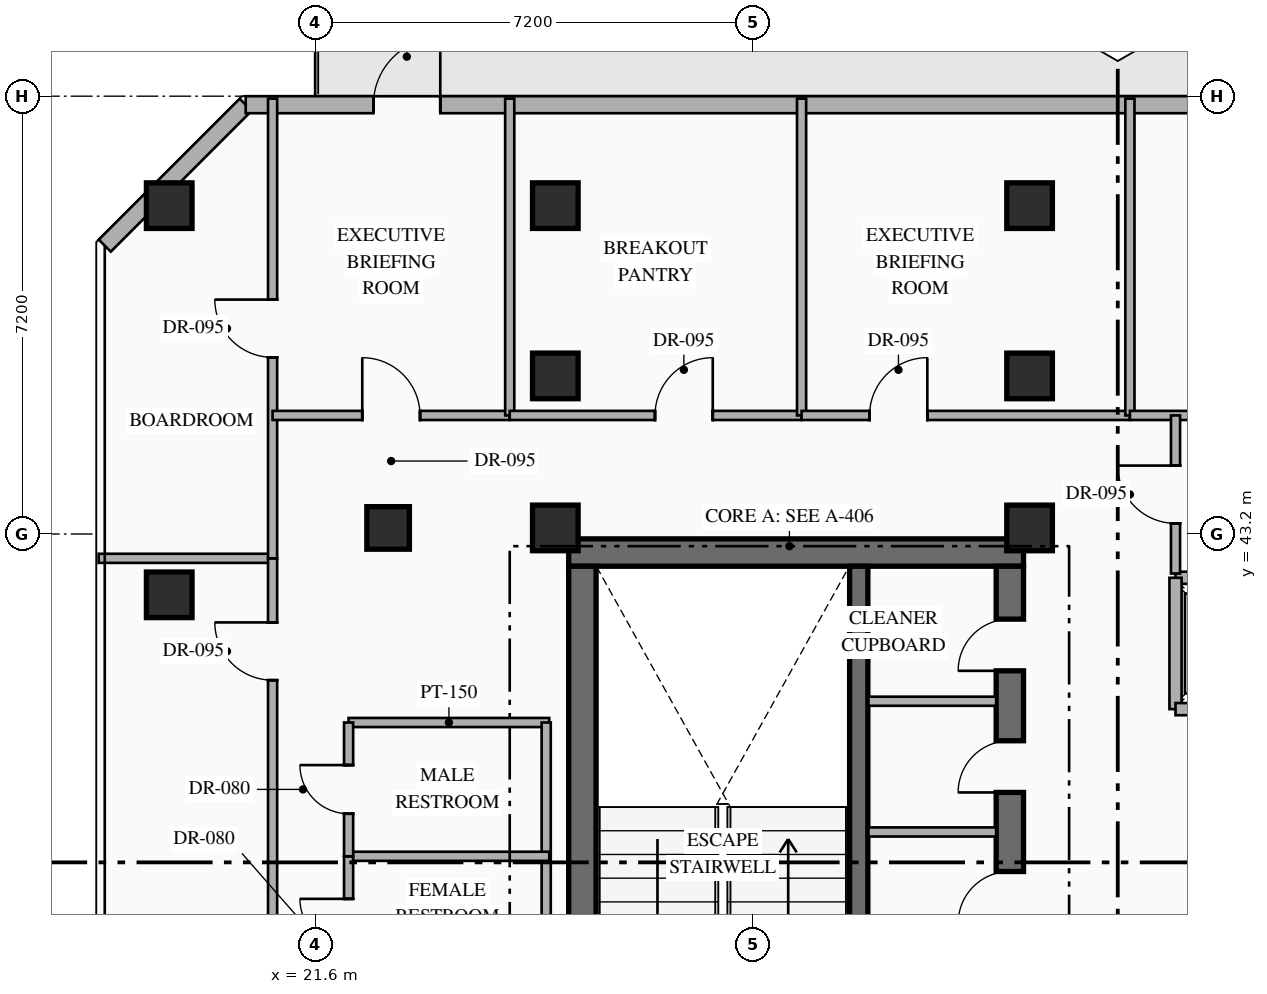
"""IFC4 building model, lengths in metres.
Left out: names, types, materials, properties, quantities, classifications, styles, units other than length and angle.
Written with IfcOpenShell. Run it as: python <this file> out.ifc"""

import sys

from ifc_helpers import new_model, si_unit, direction, frame, frame_2d, origin, origin_2d, place, context, subcontext, project, spatial, rectangle, hollow_rectangle, extrude, element, fill, save


model = new_model("IFC4")
c1 = context("Model", 3, precision=1e-05, world=origin(), true_north=direction((0.0, 1.0)))
c2 = subcontext(c1, "Body", "Model", "MODEL_VIEW")
j1 = project(units=[si_unit("LENGTHUNIT", "METRE"), si_unit("PLANEANGLEUNIT", "RADIAN")], contexts=[c1])
p1 = place(None, origin())
s1 = spatial("IfcSite", under=j1, at=p1, CompositionType="ELEMENT")
p2 = place(p1, origin())
s2 = spatial("IfcBuilding", under=s1, at=p2, CompositionType="ELEMENT")
p3 = place(p2, frame((0.0, 0.0, 195.15)))
s3 = spatial("IfcBuildingStorey", under=s2, at=p3, CompositionType="ELEMENT", Elevation=195.15)
p4 = place(p3, frame((25.77, 42.895, 0.0), z_axis=(0.0, 0.0, 1.0), x_axis=(1.0, 0.0, 0.0)))
e1 = element("IfcWall", 1, at=p4, inside=s3, PredefinedType="SHEAR", context=c2, shape_type="SweptSolid", body=[
    extrude(rectangle(XDim=7.48, YDim=0.45, at=frame_2d((3.74, 0.0))), origin(), (0.0, 0.0, 1.0), 3.6),
])
p5 = place(p3, frame((25.995, 33.19, 0.0), z_axis=(0.0, 0.0, 1.0), x_axis=(0.0, 1.0, 0.0)))
e2 = element("IfcWall", 2, at=p5, inside=s3, PredefinedType="SHEAR", context=c2, shape_type="SweptSolid", body=[
    extrude(rectangle(XDim=9.48, YDim=0.45, at=frame_2d((4.74, 0.0))), origin(), (0.0, 0.0, 1.0), 3.6),
])
p6 = place(p3, frame((33.025, 33.19, 0.0), z_axis=(0.0, 0.0, 1.0), x_axis=(0.0, 1.0, 0.0)))
e3 = element("IfcWall", 3, at=p6, inside=s3, PredefinedType="SHEAR", context=c2, shape_type="SweptSolid", body=[
    extrude(rectangle(XDim=9.48, YDim=0.45, at=frame_2d((4.74, 0.0))), origin(), (0.0, 0.0, 1.0), 3.6),
])
p7 = place(p6, frame((3.61, 0.0, 0.0)))
e4 = element("IfcOpeningElement", 4, at=p7, cuts=e3, PredefinedType="OPENING", context=c2, shape_type="SweptSolid", body=[
    extrude(rectangle(XDim=0.85, YDim=2.08, at=frame_2d((0.425, 1.04))), frame((0.0, 0.235, 0.0), z_axis=(0.0, -1.0, 0.0), x_axis=(1.0, 0.0, 0.0)), (0.0, 0.0, 1.0), 0.47),
])
p8 = place(p6, frame((5.76, 0.0, 0.0)))
e5 = element("IfcOpeningElement", 5, at=p8, cuts=e3, PredefinedType="OPENING", context=c2, shape_type="SweptSolid", body=[
    extrude(rectangle(XDim=0.85, YDim=2.08, at=frame_2d((0.425, 1.04))), frame((0.0, 0.235, 0.0), z_axis=(0.0, -1.0, 0.0), x_axis=(1.0, 0.0, 0.0)), (0.0, 0.0, 1.0), 0.47),
])
p9 = place(p6, frame((7.76, 0.0, 0.0)))
e6 = element("IfcOpeningElement", 6, at=p9, cuts=e3, PredefinedType="OPENING", context=c2, shape_type="SweptSolid", body=[
    extrude(rectangle(XDim=0.85, YDim=2.08, at=frame_2d((0.425, 1.04))), frame((0.0, 0.235, 0.0), z_axis=(0.0, -1.0, 0.0), x_axis=(1.0, 0.0, 0.0)), (0.0, 0.0, 1.0), 0.47),
])
p10 = place(p3, frame((30.54, 33.19, 0.0), z_axis=(0.0, 0.0, 1.0), x_axis=(0.0, 1.0, 0.0)))
e7 = element("IfcWall", 7, at=p10, inside=s3, PredefinedType="SHEAR", context=c2, shape_type="SweptSolid", body=[
    extrude(rectangle(XDim=9.48, YDim=0.3, at=frame_2d((4.74, 0.0))), origin(), (0.0, 0.0, 1.0), 3.6),
])
for number, where, z_axis, x_axis in (
    (8, (25.55, 43.3, 0.0), (0.0, 0.0, 1.0), (1.0, 0.0, 0.0)),
    (9, (33.35, 43.3, 0.0), (0.0, 0.0, 1.0), (1.0, 0.0, 0.0)),
    (10, (25.55, 45.8, 0.0), (0.0, 0.0, 1.0), (1.0, 0.0, 0.0)),
    (11, (33.35, 45.8, 0.0), (0.0, 0.0, 1.0), (1.0, 0.0, 0.0)),
    (12, (19.2, 48.6, 0.0), (0.0, 0.0, 1.0), (1.0, 0.0, 0.0)),
    (13, (25.55, 48.6, 0.0), (0.0, 0.0, 1.0), (1.0, 0.0, 0.0)),
    (14, (33.35, 48.6, 0.0), (0.0, 0.0, 1.0), (1.0, 0.0, 0.0)),
    (15, (19.2, 42.2, 0.0), (0.0, 0.0, 1.0), (1.0, 0.0, 0.0)),
):
    element("IfcColumn", number, at=place(p3, frame(where, z_axis=z_axis, x_axis=x_axis)), inside=s3, PredefinedType="COLUMN", context=c2, shape_type="SweptSolid", body=[
        extrude(hollow_rectangle(XDim=0.75, YDim=0.75, WallThickness=0.028, at=origin_2d()), origin(), (0.0, 0.0, 1.0), 3.6),
    ])
p11 = place(p3, frame((22.8, 43.3, 0.0), z_axis=(0.0, 0.0, 1.0), x_axis=(1.0, 0.0, 0.0)))
e16 = element("IfcColumn", 16, at=p11, inside=s3, PredefinedType="COLUMN", context=c2, shape_type="SweptSolid", body=[
    extrude(hollow_rectangle(XDim=0.7, YDim=0.7, WallThickness=0.028, at=origin_2d()), origin(), (0.0, 0.0, 1.0), 3.6),
])
p12 = place(p3, frame((18.14, 47.942, 0.0), z_axis=(0.0, 0.0, 1.0), x_axis=(0.707106781187, 0.707106781187, 0.0)))
e17 = element("IfcWall", 17, at=p12, inside=s3, PredefinedType="STANDARD", context=c2, shape_type="SweptSolid", body=[
    extrude(rectangle(XDim=3.278, YDim=0.28, at=frame_2d((1.639, 0.0))), origin(), (0.0, 0.0, 1.0), 3.35),
])
p13 = place(p3, frame((20.458, 50.26, 0.0), z_axis=(0.0, 0.0, 1.0), x_axis=(1.0, 0.0, 0.0)))
e18 = element("IfcWall", 18, at=p13, inside=s3, PredefinedType="STANDARD", context=c2, shape_type="SweptSolid", body=[
    extrude(rectangle(XDim=22.084, YDim=0.28, at=frame_2d((11.042, 0.0))), origin(), (0.0, 0.0, 1.0), 3.35),
])
p14 = place(p13, frame((2.1, 0.0, 0.0)))
e19 = element("IfcOpeningElement", 19, at=p14, cuts=e18, PredefinedType="OPENING", context=c2, shape_type="SweptSolid", body=[
    extrude(rectangle(XDim=1.1, YDim=2.2, at=frame_2d((0.55, 1.1))), frame((0.0, 0.15, 0.0), z_axis=(0.0, -1.0, 0.0), x_axis=(1.0, 0.0, 0.0)), (0.0, 0.0, 1.0), 0.3),
])
p15 = place(p13, frame((16.326, 0.0, 0.85)))
e20 = element("IfcOpeningElement", 20, at=p15, cuts=e18, PredefinedType="OPENING", context=c2, shape_type="SweptSolid", body=[
    extrude(rectangle(XDim=1.8, YDim=2.1, at=frame_2d((0.9, 1.05))), frame((0.0, 0.15, 0.0), z_axis=(0.0, -1.0, 0.0), x_axis=(1.0, 0.0, 0.0)), (0.0, 0.0, 1.0), 0.3),
])
for number, where, z_axis, x_axis in (
    (21, (30.7, 38.3, 0.0), (0.0, 0.0, 1.0), (1.0, 0.0, 0.0)),
    (22, (30.7, 40.45, 0.0), (0.0, 0.0, 1.0), (1.0, 0.0, 0.0)),
):
    element("IfcWall", number, at=place(p3, frame(where, z_axis=z_axis, x_axis=x_axis)), inside=s3, PredefinedType="PARTITIONING", context=c2, shape_type="SweptSolid", body=[
        extrude(rectangle(XDim=2.1, YDim=0.15, at=frame_2d((1.05, 0.0))), origin(), (0.0, 0.0, 1.0), 3.35),
    ])
p16 = place(p3, frame((35.75, 42.48, 0.0), z_axis=(0.0, 0.0, 1.0), x_axis=(1.0, 0.0, 0.0)))
e23 = element("IfcWall", 23, at=p16, inside=s3, PredefinedType="STANDARD", context=c2, shape_type="SweptSolid", body=[
    extrude(rectangle(XDim=9.11, YDim=0.2, at=frame_2d((4.555, 0.0))), origin(), (0.0, 0.0, 1.0), 3.35),
])
p17 = place(p3, frame((35.75, 40.32, 0.0), z_axis=(0.0, 0.0, 1.0), x_axis=(0.0, 1.0, 0.0)))
e24 = element("IfcWall", 24, at=p17, inside=s3, PredefinedType="STANDARD", context=c2, shape_type="SweptSolid", body=[
    extrude(rectangle(XDim=2.16, YDim=0.2, at=frame_2d((1.08, 0.0))), origin(), (0.0, 0.0, 1.0), 3.35),
])
p18 = place(p3, frame((35.75, 40.32, 0.0), z_axis=(0.0, 0.0, 1.0), x_axis=(1.0, 0.0, 0.0)))
e25 = element("IfcWall", 25, at=p18, inside=s3, PredefinedType="STANDARD", context=c2, shape_type="SweptSolid", body=[
    extrude(rectangle(XDim=9.11, YDim=0.2, at=frame_2d((4.555, 0.0))), origin(), (0.0, 0.0, 1.0), 3.35),
])
p19 = place(p18, frame((0.53, 0.0, 0.0)))
e26 = element("IfcOpeningElement", 26, at=p19, cuts=e25, PredefinedType="OPENING", context=c2, shape_type="SweptSolid", body=[
    extrude(rectangle(XDim=1.1, YDim=2.18, at=frame_2d((0.55, 1.09))), frame((0.0, 0.11, 0.0), z_axis=(0.0, -1.0, 0.0), x_axis=(1.0, 0.0, 0.0)), (0.0, 0.0, 1.0), 0.22),
])
p20 = place(p18, frame((2.73, 0.0, 0.0)))
e27 = element("IfcOpeningElement", 27, at=p20, cuts=e25, PredefinedType="OPENING", context=c2, shape_type="SweptSolid", body=[
    extrude(rectangle(XDim=1.1, YDim=2.18, at=frame_2d((0.55, 1.09))), frame((0.0, 0.11, 0.0), z_axis=(0.0, -1.0, 0.0), x_axis=(1.0, 0.0, 0.0)), (0.0, 0.0, 1.0), 0.22),
])
p21 = place(p18, frame((4.93, 0.0, 0.0)))
e28 = element("IfcOpeningElement", 28, at=p21, cuts=e25, PredefinedType="OPENING", context=c2, shape_type="SweptSolid", body=[
    extrude(rectangle(XDim=1.1, YDim=2.18, at=frame_2d((0.55, 1.09))), frame((0.0, 0.11, 0.0), z_axis=(0.0, -1.0, 0.0), x_axis=(1.0, 0.0, 0.0)), (0.0, 0.0, 1.0), 0.22),
])
p22 = place(p18, frame((7.13, 0.0, 0.0)))
e29 = element("IfcOpeningElement", 29, at=p22, cuts=e25, PredefinedType="OPENING", context=c2, shape_type="SweptSolid", body=[
    extrude(rectangle(XDim=1.1, YDim=2.18, at=frame_2d((0.55, 1.09))), frame((0.0, 0.11, 0.0), z_axis=(0.0, -1.0, 0.0), x_axis=(1.0, 0.0, 0.0)), (0.0, 0.0, 1.0), 0.22),
])
p23 = place(p3, frame((22.15, 40.1, 0.0), z_axis=(0.0, 0.0, 1.0), x_axis=(1.0, 0.0, 0.0)))
e30 = element("IfcWall", 30, at=p23, inside=s3, PredefinedType="PARTITIONING", context=c2, shape_type="SweptSolid", body=[
    extrude(rectangle(XDim=3.3, YDim=0.15, at=frame_2d((1.65, 0.0))), origin(), (0.0, 0.0, 1.0), 3.35),
])
p24 = place(p3, frame((25.4, 33.5, 0.0), z_axis=(0.0, 0.0, 1.0), x_axis=(0.0, 1.0, 0.0)))
e31 = element("IfcWall", 31, at=p24, inside=s3, PredefinedType="PARTITIONING", context=c2, shape_type="SweptSolid", body=[
    extrude(rectangle(XDim=6.6, YDim=0.15, at=frame_2d((3.3, 0.0))), origin(), (0.0, 0.0, 1.0), 3.35),
])
p25 = place(p3, frame((22.15, 37.9, 0.0), z_axis=(0.0, 0.0, 1.0), x_axis=(1.0, 0.0, 0.0)))
e32 = element("IfcWall", 32, at=p25, inside=s3, PredefinedType="PARTITIONING", context=c2, shape_type="SweptSolid", body=[
    extrude(rectangle(XDim=3.3, YDim=0.15, at=frame_2d((1.65, 0.0))), origin(), (0.0, 0.0, 1.0), 3.35),
])
p26 = place(p3, frame((22.15, 35.7, 0.0), z_axis=(0.0, 0.0, 1.0), x_axis=(0.0, 1.0, 0.0)))
e33 = element("IfcWall", 33, at=p26, inside=s3, PredefinedType="PARTITIONING", context=c2, shape_type="SweptSolid", body=[
    extrude(rectangle(XDim=2.2, YDim=0.15, at=frame_2d((1.1, 0.0))), origin(), (0.0, 0.0, 1.0), 3.35),
])
p27 = place(p26, frame((0.7, 0.0, 0.0)))
e34 = element("IfcOpeningElement", 34, at=p27, cuts=e33, PredefinedType="OPENING", context=c2, shape_type="SweptSolid", body=[
    extrude(rectangle(XDim=0.8, YDim=2.06, at=frame_2d((0.4, 1.03))), frame((0.0, 0.085, 0.0), z_axis=(0.0, -1.0, 0.0), x_axis=(1.0, 0.0, 0.0)), (0.0, 0.0, 1.0), 0.17),
])
p28 = place(p3, frame((22.15, 37.9, 0.0), z_axis=(0.0, 0.0, 1.0), x_axis=(0.0, 1.0, 0.0)))
e35 = element("IfcWall", 35, at=p28, inside=s3, PredefinedType="PARTITIONING", context=c2, shape_type="SweptSolid", body=[
    extrude(rectangle(XDim=2.2, YDim=0.15, at=frame_2d((1.1, 0.0))), origin(), (0.0, 0.0, 1.0), 3.35),
])
p29 = place(p28, frame((0.7, 0.0, 0.0)))
e36 = element("IfcOpeningElement", 36, at=p29, cuts=e35, PredefinedType="OPENING", context=c2, shape_type="SweptSolid", body=[
    extrude(rectangle(XDim=0.8, YDim=2.06, at=frame_2d((0.4, 1.03))), frame((0.0, 0.085, 0.0), z_axis=(0.0, -1.0, 0.0), x_axis=(1.0, 0.0, 0.0)), (0.0, 0.0, 1.0), 0.17),
])
p30 = place(p3, frame((18.04, 42.8, 0.0), z_axis=(0.0, 0.0, 1.0), x_axis=(1.0, 0.0, 0.0)))
e37 = element("IfcWall", 37, at=p30, inside=s3, PredefinedType="PARTITIONING", context=c2, shape_type="SweptSolid", body=[
    extrude(rectangle(XDim=2.86, YDim=0.15, at=frame_2d((1.43, 0.0))), origin(), (0.0, 0.0, 1.0), 3.35),
])
p31 = place(p3, frame((20.9, 36.6, 0.0), z_axis=(0.0, 0.0, 1.0), x_axis=(0.0, 1.0, 0.0)))
e38 = element("IfcWall", 38, at=p31, inside=s3, PredefinedType="PARTITIONING", context=c2, shape_type="SweptSolid", body=[
    extrude(rectangle(XDim=6.2, YDim=0.15, at=frame_2d((3.1, 0.0))), origin(), (0.0, 0.0, 1.0), 3.35),
])
p32 = place(p31, frame((4.196, 0.0, 0.0)))
e39 = element("IfcOpeningElement", 39, at=p32, cuts=e38, PredefinedType="OPENING", context=c2, shape_type="SweptSolid", body=[
    extrude(rectangle(XDim=0.95, YDim=2.15, at=frame_2d((0.475, 1.075))), frame((0.0, 0.085, 0.0), z_axis=(0.0, -1.0, 0.0), x_axis=(1.0, 0.0, 0.0)), (0.0, 0.0, 1.0), 0.17),
])
p33 = place(p3, frame((20.9, 42.8, 0.0), z_axis=(0.0, 0.0, 1.0), x_axis=(0.0, 1.0, 0.0)))
e40 = element("IfcWall", 40, at=p33, inside=s3, PredefinedType="PARTITIONING", context=c2, shape_type="SweptSolid", body=[
    extrude(rectangle(XDim=7.56, YDim=0.15, at=frame_2d((3.78, 0.0))), origin(), (0.0, 0.0, 1.0), 3.35),
])
p34 = place(p33, frame((3.305, 0.0, 0.0)))
e41 = element("IfcOpeningElement", 41, at=p34, cuts=e40, PredefinedType="OPENING", context=c2, shape_type="SweptSolid", body=[
    extrude(rectangle(XDim=0.95, YDim=2.15, at=frame_2d((0.475, 1.075))), frame((0.0, 0.085, 0.0), z_axis=(0.0, -1.0, 0.0), x_axis=(1.0, 0.0, 0.0)), (0.0, 0.0, 1.0), 0.17),
])
p35 = place(p3, frame((20.9, 45.15, 0.0), z_axis=(0.0, 0.0, 1.0), x_axis=(1.0, 0.0, 0.0)))
e42 = element("IfcWall", 42, at=p35, inside=s3, PredefinedType="PARTITIONING", context=c2, shape_type="SweptSolid", body=[
    extrude(rectangle(XDim=3.9, YDim=0.15, at=frame_2d((1.95, 0.0))), origin(), (0.0, 0.0, 1.0), 3.35),
])
p36 = place(p35, frame((1.475, 0.0, 0.0)))
e43 = element("IfcOpeningElement", 43, at=p36, cuts=e42, PredefinedType="OPENING", context=c2, shape_type="SweptSolid", body=[
    extrude(rectangle(XDim=0.95, YDim=2.15, at=frame_2d((0.475, 1.075))), frame((0.0, 0.085, 0.0), z_axis=(0.0, -1.0, 0.0), x_axis=(1.0, 0.0, 0.0)), (0.0, 0.0, 1.0), 0.17),
])
p37 = place(p3, frame((24.8, 45.15, 0.0), z_axis=(0.0, 0.0, 1.0), x_axis=(0.0, 1.0, 0.0)))
e44 = element("IfcWall", 44, at=p37, inside=s3, PredefinedType="PARTITIONING", context=c2, shape_type="SweptSolid", body=[
    extrude(rectangle(XDim=5.21, YDim=0.15, at=frame_2d((2.605, 0.0))), origin(), (0.0, 0.0, 1.0), 3.35),
])
p38 = place(p3, frame((24.8, 45.15, 0.0), z_axis=(0.0, 0.0, 1.0), x_axis=(1.0, 0.0, 0.0)))
e45 = element("IfcWall", 45, at=p38, inside=s3, PredefinedType="PARTITIONING", context=c2, shape_type="SweptSolid", body=[
    extrude(rectangle(XDim=4.8, YDim=0.15, at=frame_2d((2.4, 0.0))), origin(), (0.0, 0.0, 1.0), 3.35),
])
p39 = place(p38, frame((2.389, 0.0, 0.0)))
e46 = element("IfcOpeningElement", 46, at=p39, cuts=e45, PredefinedType="OPENING", context=c2, shape_type="SweptSolid", body=[
    extrude(rectangle(XDim=0.95, YDim=2.15, at=frame_2d((0.475, 1.075))), frame((0.0, 0.085, 0.0), z_axis=(0.0, -1.0, 0.0), x_axis=(1.0, 0.0, 0.0)), (0.0, 0.0, 1.0), 0.17),
])
p40 = place(p3, frame((29.6, 45.15, 0.0), z_axis=(0.0, 0.0, 1.0), x_axis=(0.0, 1.0, 0.0)))
e47 = element("IfcWall", 47, at=p40, inside=s3, PredefinedType="PARTITIONING", context=c2, shape_type="SweptSolid", body=[
    extrude(rectangle(XDim=5.21, YDim=0.15, at=frame_2d((2.605, 0.0))), origin(), (0.0, 0.0, 1.0), 3.35),
])
p41 = place(p3, frame((29.6, 45.15, 0.0), z_axis=(0.0, 0.0, 1.0), x_axis=(1.0, 0.0, 0.0)))
e48 = element("IfcWall", 48, at=p41, inside=s3, PredefinedType="PARTITIONING", context=c2, shape_type="SweptSolid", body=[
    extrude(rectangle(XDim=5.4, YDim=0.15, at=frame_2d((2.7, 0.0))), origin(), (0.0, 0.0, 1.0), 3.35),
])
p42 = place(p41, frame((1.118, 0.0, 0.0)))
e49 = element("IfcOpeningElement", 49, at=p42, cuts=e48, PredefinedType="OPENING", context=c2, shape_type="SweptSolid", body=[
    extrude(rectangle(XDim=0.95, YDim=2.15, at=frame_2d((0.475, 1.075))), frame((0.0, 0.085, 0.0), z_axis=(0.0, -1.0, 0.0), x_axis=(1.0, 0.0, 0.0)), (0.0, 0.0, 1.0), 0.17),
])
p43 = place(p3, frame((35.0, 45.15, 0.0), z_axis=(0.0, 0.0, 1.0), x_axis=(0.0, 1.0, 0.0)))
e50 = element("IfcWall", 50, at=p43, inside=s3, PredefinedType="PARTITIONING", context=c2, shape_type="SweptSolid", body=[
    extrude(rectangle(XDim=5.21, YDim=0.15, at=frame_2d((2.605, 0.0))), origin(), (0.0, 0.0, 1.0), 3.35),
])
p44 = place(p3, frame((35.0, 45.15, 0.0), z_axis=(0.0, 0.0, 1.0), x_axis=(1.0, 0.0, 0.0)))
e51 = element("IfcWall", 51, at=p44, inside=s3, PredefinedType="PARTITIONING", context=c2, shape_type="SweptSolid", body=[
    extrude(rectangle(XDim=5.2, YDim=0.15, at=frame_2d((2.6, 0.0))), origin(), (0.0, 0.0, 1.0), 3.35),
])
p45 = place(p44, frame((2.125, 0.0, 0.0)))
e52 = element("IfcOpeningElement", 52, at=p45, cuts=e51, PredefinedType="OPENING", context=c2, shape_type="SweptSolid", body=[
    extrude(rectangle(XDim=0.95, YDim=2.15, at=frame_2d((0.475, 1.075))), frame((0.0, 0.085, 0.0), z_axis=(0.0, -1.0, 0.0), x_axis=(1.0, 0.0, 0.0)), (0.0, 0.0, 1.0), 0.17),
])
p46 = place(p3, frame((35.75, 42.55, 0.0), z_axis=(0.0, 0.0, 1.0), x_axis=(0.0, 1.0, 0.0)))
e53 = element("IfcWall", 53, at=p46, inside=s3, PredefinedType="PARTITIONING", context=c2, shape_type="SweptSolid", body=[
    extrude(rectangle(XDim=2.6, YDim=0.15, at=frame_2d((1.3, 0.0))), origin(), (0.0, 0.0, 1.0), 3.35),
])
p47 = place(p46, frame((0.825, 0.0, 0.0)))
e54 = element("IfcOpeningElement", 54, at=p47, cuts=e53, PredefinedType="OPENING", context=c2, shape_type="SweptSolid", body=[
    extrude(rectangle(XDim=0.95, YDim=2.15, at=frame_2d((0.475, 1.075))), frame((0.0, 0.085, 0.0), z_axis=(0.0, -1.0, 0.0), x_axis=(1.0, 0.0, 0.0)), (0.0, 0.0, 1.0), 0.17),
])
p48 = place(p14, origin())
e55 = element("IfcDoor", 55, at=p48, inside=s3, OperationType="SINGLE_SWING_RIGHT", PredefinedType="DOOR", context=c2, shape_type="SweptSolid", body=[
    extrude(rectangle(XDim=1.1, YDim=2.2, at=frame_2d((0.55, 1.1))), frame((0.0, 0.025, 0.0), z_axis=(0.0, -1.0, 0.0), x_axis=(1.0, 0.0, 0.0)), (0.0, 0.0, 1.0), 0.05),
])
fill(e19, e55)
p49 = place(p7, origin())
e56 = element("IfcDoor", 56, at=p49, inside=s3, OperationType="SINGLE_SWING_LEFT", PredefinedType="DOOR", context=c2, shape_type="SweptSolid", body=[
    extrude(rectangle(XDim=0.85, YDim=2.08, at=frame_2d((0.425, 1.04))), frame((0.0, 0.025, 0.0), z_axis=(0.0, -1.0, 0.0), x_axis=(1.0, 0.0, 0.0)), (0.0, 0.0, 1.0), 0.05),
])
fill(e4, e56)
p50 = place(p8, origin())
e57 = element("IfcDoor", 57, at=p50, inside=s3, OperationType="SINGLE_SWING_LEFT", PredefinedType="DOOR", context=c2, shape_type="SweptSolid", body=[
    extrude(rectangle(XDim=0.85, YDim=2.08, at=frame_2d((0.425, 1.04))), frame((0.0, 0.025, 0.0), z_axis=(0.0, -1.0, 0.0), x_axis=(1.0, 0.0, 0.0)), (0.0, 0.0, 1.0), 0.05),
])
fill(e5, e57)
p51 = place(p9, origin())
e58 = element("IfcDoor", 58, at=p51, inside=s3, OperationType="SINGLE_SWING_LEFT", PredefinedType="DOOR", context=c2, shape_type="SweptSolid", body=[
    extrude(rectangle(XDim=0.85, YDim=2.08, at=frame_2d((0.425, 1.04))), frame((0.0, 0.025, 0.0), z_axis=(0.0, -1.0, 0.0), x_axis=(1.0, 0.0, 0.0)), (0.0, 0.0, 1.0), 0.05),
])
fill(e6, e58)
p52 = place(p27, origin())
e59 = element("IfcDoor", 59, at=p52, inside=s3, OperationType="SINGLE_SWING_RIGHT", PredefinedType="DOOR", context=c2, shape_type="SweptSolid", body=[
    extrude(rectangle(XDim=0.8, YDim=2.06, at=frame_2d((0.4, 1.03))), frame((0.0, 0.025, 0.0), z_axis=(0.0, -1.0, 0.0), x_axis=(1.0, 0.0, 0.0)), (0.0, 0.0, 1.0), 0.05),
])
fill(e34, e59)
p53 = place(p29, origin())
e60 = element("IfcDoor", 60, at=p53, inside=s3, OperationType="SINGLE_SWING_RIGHT", PredefinedType="DOOR", context=c2, shape_type="SweptSolid", body=[
    extrude(rectangle(XDim=0.8, YDim=2.06, at=frame_2d((0.4, 1.03))), frame((0.0, 0.025, 0.0), z_axis=(0.0, -1.0, 0.0), x_axis=(1.0, 0.0, 0.0)), (0.0, 0.0, 1.0), 0.05),
])
fill(e36, e60)
p54 = place(p32, origin())
e61 = element("IfcDoor", 61, at=p54, inside=s3, OperationType="SINGLE_SWING_RIGHT", PredefinedType="DOOR", context=c2, shape_type="SweptSolid", body=[
    extrude(rectangle(XDim=0.95, YDim=2.15, at=frame_2d((0.475, 1.075))), frame((0.0, 0.025, 0.0), z_axis=(0.0, -1.0, 0.0), x_axis=(1.0, 0.0, 0.0)), (0.0, 0.0, 1.0), 0.05),
])
fill(e39, e61)
p55 = place(p34, origin())
e62 = element("IfcDoor", 62, at=p55, inside=s3, OperationType="SINGLE_SWING_RIGHT", PredefinedType="DOOR", context=c2, shape_type="SweptSolid", body=[
    extrude(rectangle(XDim=0.95, YDim=2.15, at=frame_2d((0.475, 1.075))), frame((0.0, 0.025, 0.0), z_axis=(0.0, -1.0, 0.0), x_axis=(1.0, 0.0, 0.0)), (0.0, 0.0, 1.0), 0.05),
])
fill(e41, e62)
p56 = place(p36, origin())
e63 = element("IfcDoor", 63, at=p56, inside=s3, OperationType="SINGLE_SWING_LEFT", PredefinedType="DOOR", context=c2, shape_type="SweptSolid", body=[
    extrude(rectangle(XDim=0.95, YDim=2.15, at=frame_2d((0.475, 1.075))), frame((0.0, 0.025, 0.0), z_axis=(0.0, -1.0, 0.0), x_axis=(1.0, 0.0, 0.0)), (0.0, 0.0, 1.0), 0.05),
])
fill(e43, e63)
p57 = place(p39, origin())
e64 = element("IfcDoor", 64, at=p57, inside=s3, OperationType="SINGLE_SWING_RIGHT", PredefinedType="DOOR", context=c2, shape_type="SweptSolid", body=[
    extrude(rectangle(XDim=0.95, YDim=2.15, at=frame_2d((0.475, 1.075))), frame((0.0, 0.025, 0.0), z_axis=(0.0, -1.0, 0.0), x_axis=(1.0, 0.0, 0.0)), (0.0, 0.0, 1.0), 0.05),
])
fill(e46, e64)
p58 = place(p42, origin())
e65 = element("IfcDoor", 65, at=p58, inside=s3, OperationType="SINGLE_SWING_RIGHT", PredefinedType="DOOR", context=c2, shape_type="SweptSolid", body=[
    extrude(rectangle(XDim=0.95, YDim=2.15, at=frame_2d((0.475, 1.075))), frame((0.0, 0.025, 0.0), z_axis=(0.0, -1.0, 0.0), x_axis=(1.0, 0.0, 0.0)), (0.0, 0.0, 1.0), 0.05),
])
fill(e49, e65)
p59 = place(p47, origin())
e66 = element("IfcDoor", 66, at=p59, inside=s3, OperationType="SINGLE_SWING_RIGHT", PredefinedType="DOOR", context=c2, shape_type="SweptSolid", body=[
    extrude(rectangle(XDim=0.95, YDim=2.15, at=frame_2d((0.475, 1.075))), frame((0.0, 0.025, 0.0), z_axis=(0.0, -1.0, 0.0), x_axis=(1.0, 0.0, 0.0)), (0.0, 0.0, 1.0), 0.05),
])
fill(e54, e66)
save(model, sys.argv[1])
